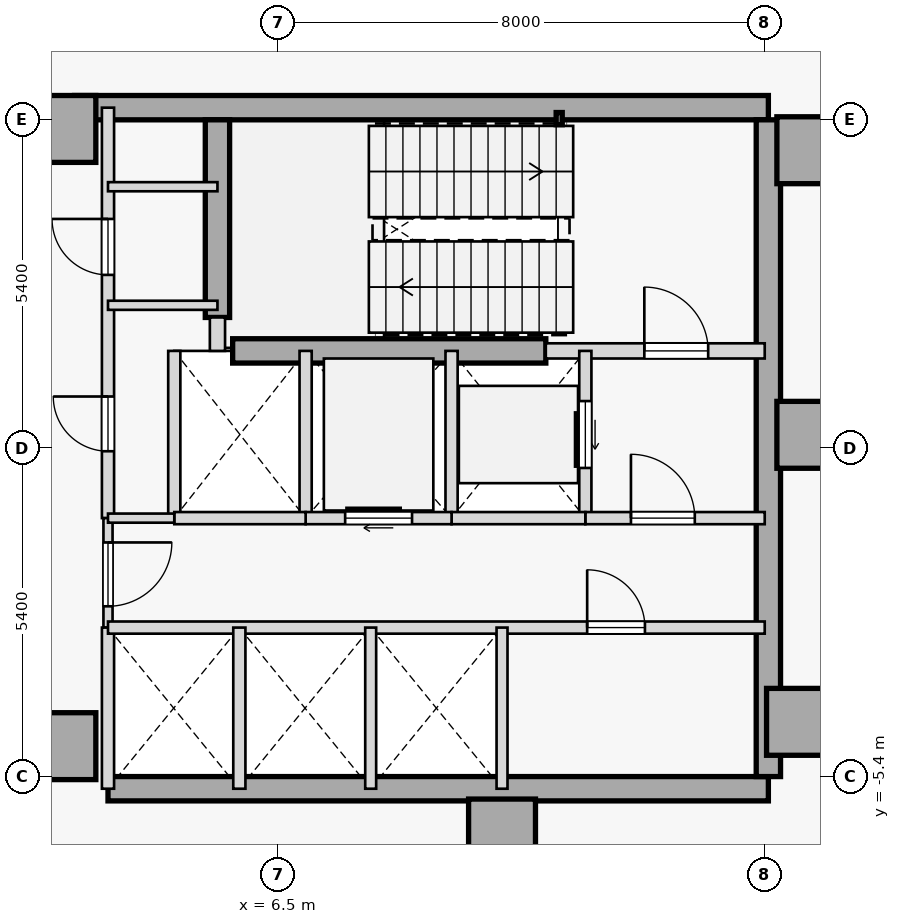
"""IFC4 building model, lengths in metres.
Left out: names, types, materials, properties, quantities, classifications, styles, units other than length and angle.
Written with IfcOpenShell. Run it as: python <this file> out.ifc"""

import sys

from ifc_helpers import new_model, si_unit, direction, frame, frame_2d, origin, origin_2d, place, context, subcontext, project, spatial, rectangle, hollow_rectangle, extrude, element, fill, save


model = new_model("IFC4")
c1 = context("Model", 3, precision=1e-05, world=origin(), true_north=direction((0.0, 1.0)))
c2 = subcontext(c1, "Body", "Model", "MODEL_VIEW")
j1 = project(units=[si_unit("LENGTHUNIT", "METRE"), si_unit("PLANEANGLEUNIT", "RADIAN")], contexts=[c1])
p1 = place(None, origin())
s1 = spatial("IfcSite", under=j1, at=p1, CompositionType="ELEMENT")
p2 = place(p1, origin())
s2 = spatial("IfcBuilding", under=s1, at=p2, CompositionType="ELEMENT")
p3 = place(p2, frame((0.0, 0.0, 142.9)))
s3 = spatial("IfcBuildingStorey", under=s2, at=p3, CompositionType="ELEMENT", Elevation=142.9)
for number, where, z_axis, x_axis in (
    (1, (15.25, 4.9, 0.0), (0.0, 0.0, 1.0), (1.0, 0.0, 0.0)),
    (2, (15.25, 0.22, 0.0), (0.0, 0.0, 1.0), (1.0, 0.0, 0.0)),
    (3, (15.08, -4.5, 0.0), (0.0, 0.0, 1.0), (1.0, 0.0, 0.0)),
    (4, (10.18, -6.32, 0.0), (0.0, 0.0, 1.0), (1.0, 0.0, 0.0)),
    (5, (2.95, -4.9, 0.0), (0.0, 0.0, 1.0), (1.0, 0.0, 0.0)),
    (6, (2.95, 5.25, 0.0), (0.0, 0.0, 1.0), (1.0, 0.0, 0.0)),
):
    element("IfcColumn", number, at=place(p3, frame(where, z_axis=z_axis, x_axis=x_axis)), inside=s3, PredefinedType="COLUMN", context=c2, shape_type="SweptSolid", body=[
        extrude(rectangle(XDim=1.1, YDim=1.1, at=origin_2d()), origin(), (0.0, 0.0, 1.0), 4.4),
    ])
p4 = place(p3, frame((3.15, 5.6, 0.0), z_axis=(0.0, 0.0, 1.0), x_axis=(1.0, 0.0, 0.0)))
e7 = element("IfcWall", 7, at=p4, inside=s3, PredefinedType="SHEAR", context=c2, shape_type="SweptSolid", body=[
    extrude(rectangle(XDim=11.41, YDim=0.4, at=frame_2d((5.705, 0.0))), origin(), (0.0, 0.0, 1.0), 4.15),
])
p5 = place(p3, frame((3.7, -5.6, 0.0), z_axis=(0.0, 0.0, 1.0), x_axis=(1.0, 0.0, 0.0)))
e8 = element("IfcWall", 8, at=p5, inside=s3, PredefinedType="SHEAR", context=c2, shape_type="SweptSolid", body=[
    extrude(rectangle(XDim=10.86, YDim=0.4, at=frame_2d((5.43, 0.0))), origin(), (0.0, 0.0, 1.0), 4.15),
])
p6 = place(p3, frame((14.56, -5.4, 0.0), z_axis=(0.0, 0.0, 1.0), x_axis=(0.0, 1.0, 0.0)))
e9 = element("IfcWall", 9, at=p6, inside=s3, PredefinedType="SHEAR", context=c2, shape_type="SweptSolid", body=[
    extrude(rectangle(XDim=10.8, YDim=0.4, at=frame_2d((5.4, 0.0))), origin(), (0.0, 0.0, 1.0), 4.15),
])
p7 = place(p3, frame((5.5, 2.15, 0.0), z_axis=(0.0, 0.0, 1.0), x_axis=(0.0, 1.0, 0.0)))
e10 = element("IfcWall", 10, at=p7, inside=s3, PredefinedType="SHEAR", context=c2, shape_type="SweptSolid", body=[
    extrude(rectangle(XDim=3.25, YDim=0.4, at=frame_2d((1.625, 0.0))), origin(), (0.0, 0.0, 1.0), 4.15),
])
p8 = place(p3, frame((5.75, 1.6, 0.0), z_axis=(0.0, 0.0, 1.0), x_axis=(1.0, 0.0, 0.0)))
e11 = element("IfcWall", 11, at=p8, inside=s3, PredefinedType="SHEAR", context=c2, shape_type="SweptSolid", body=[
    extrude(rectangle(XDim=5.15, YDim=0.4, at=frame_2d((2.575, 0.0))), origin(), (0.0, 0.0, 1.0), 4.15),
])
p9 = place(p3, frame((11.12, 5.42, 0.0), z_axis=(0.0, 0.0, 1.0), x_axis=(1.0, 0.0, 0.0)))
e12 = element("IfcColumn", 12, at=p9, inside=s3, PredefinedType="COLUMN", context=c2, shape_type="SweptSolid", body=[
    extrude(hollow_rectangle(XDim=0.1, YDim=0.2, WallThickness=0.008, at=origin_2d()), origin(), (0.0, 0.0, 1.0), 4.4),
])
p10 = place(p3, frame((10.9, 1.6, 0.0), z_axis=(0.0, 0.0, 1.0), x_axis=(1.0, 0.0, 0.0)))
e13 = element("IfcWall", 13, at=p10, inside=s3, PredefinedType="STANDARD", context=c2, shape_type="SweptSolid", body=[
    extrude(rectangle(XDim=3.6, YDim=0.25, at=frame_2d((1.8, 0.0))), origin(), (0.0, 0.0, 1.0), 4.15),
])
p11 = place(p10, frame((1.62, 0.0, 0.0)))
e14 = element("IfcOpeningElement", 14, at=p11, cuts=e13, PredefinedType="OPENING", context=c2, shape_type="SweptSolid", body=[
    extrude(rectangle(XDim=1.05, YDim=2.15, at=frame_2d((0.525, 1.075))), frame((0.0, 0.135, 0.0), z_axis=(0.0, -1.0, 0.0), x_axis=(1.0, 0.0, 0.0)), (0.0, 0.0, 1.0), 0.27),
])
p12 = place(p3, frame((5.5, 1.6, 0.0), z_axis=(0.0, 0.0, 1.0), x_axis=(0.0, 1.0, 0.0)))
e15 = element("IfcWall", 15, at=p12, inside=s3, PredefinedType="STANDARD", context=c2, shape_type="SweptSolid", body=[
    extrude(rectangle(XDim=0.55, YDim=0.25, at=frame_2d((0.275, 0.0))), origin(), (0.0, 0.0, 1.0), 4.15),
])
p13 = place(p3, frame((3.7, -1.15, 0.0), z_axis=(0.0, 0.0, 1.0), x_axis=(0.0, 1.0, 0.0)))
e16 = element("IfcWall", 16, at=p13, inside=s3, PredefinedType="STANDARD", context=c2, shape_type="SweptSolid", body=[
    extrude(rectangle(XDim=6.75, YDim=0.2, at=frame_2d((3.375, 0.0))), origin(), (0.0, 0.0, 1.0), 4.15),
])
p14 = place(p13, frame((1.1, 0.0, 0.0)))
e17 = element("IfcOpeningElement", 17, at=p14, cuts=e16, PredefinedType="OPENING", context=c2, shape_type="SweptSolid", body=[
    extrude(rectangle(XDim=0.9, YDim=2.15, at=frame_2d((0.45, 1.075))), frame((0.0, 0.11, 0.0), z_axis=(0.0, -1.0, 0.0), x_axis=(1.0, 0.0, 0.0)), (0.0, 0.0, 1.0), 0.22),
])
p15 = place(p13, frame((4.0, 0.0, 0.0)))
e18 = element("IfcOpeningElement", 18, at=p15, cuts=e16, PredefinedType="OPENING", context=c2, shape_type="SweptSolid", body=[
    extrude(rectangle(XDim=0.92, YDim=2.15, at=frame_2d((0.46, 1.075))), frame((0.0, 0.11, 0.0), z_axis=(0.0, -1.0, 0.0), x_axis=(1.0, 0.0, 0.0)), (0.0, 0.0, 1.0), 0.22),
])
p16 = place(p3, frame((3.7, -2.95, 0.0), z_axis=(0.0, 0.0, 1.0), x_axis=(0.0, 1.0, 0.0)))
e19 = element("IfcWall", 19, at=p16, inside=s3, PredefinedType="PARTITIONING", context=c2, shape_type="SweptSolid", body=[
    extrude(rectangle(XDim=1.8, YDim=0.15, at=frame_2d((0.9, 0.0))), origin(), (0.0, 0.0, 1.0), 4.15),
])
p17 = place(p16, frame((0.35, 0.0, 0.0)))
e20 = element("IfcOpeningElement", 20, at=p17, cuts=e19, PredefinedType="OPENING", context=c2, shape_type="SweptSolid", body=[
    extrude(rectangle(XDim=1.05, YDim=2.18, at=frame_2d((0.525, 1.09))), frame((0.0, 0.085, 0.0), z_axis=(0.0, -1.0, 0.0), x_axis=(1.0, 0.0, 0.0)), (0.0, 0.0, 1.0), 0.17),
])
p18 = place(p3, frame((3.7, -5.6, 0.0), z_axis=(0.0, 0.0, 1.0), x_axis=(0.0, 1.0, 0.0)))
e21 = element("IfcWall", 21, at=p18, inside=s3, PredefinedType="STANDARD", context=c2, shape_type="SweptSolid", body=[
    extrude(rectangle(XDim=2.65, YDim=0.2, at=frame_2d((1.325, 0.0))), origin(), (0.0, 0.0, 1.0), 4.15),
])
p19 = place(p3, frame((11.55, -1.15, 0.0), z_axis=(0.0, 0.0, 1.0), x_axis=(0.0, 1.0, 0.0)))
e22 = element("IfcWall", 22, at=p19, inside=s3, PredefinedType="STANDARD", context=c2, shape_type="SweptSolid", body=[
    extrude(rectangle(XDim=2.75, YDim=0.2, at=frame_2d((1.375, 0.0))), origin(), (0.0, 0.0, 1.0), 4.15),
])
p20 = place(p19, frame((0.825, 0.0, 0.0)))
e23 = element("IfcOpeningElement", 23, at=p20, cuts=e22, PredefinedType="OPENING", context=c2, shape_type="SweptSolid", body=[
    extrude(rectangle(XDim=1.1, YDim=2.15, at=frame_2d((0.55, 1.075))), frame((0.0, 0.11, 0.0), z_axis=(0.0, -1.0, 0.0), x_axis=(1.0, 0.0, 0.0)), (0.0, 0.0, 1.0), 0.22),
])
p21 = place(p3, frame((9.35, -1.15, 0.0), z_axis=(0.0, 0.0, 1.0), x_axis=(0.0, 1.0, 0.0)))
e24 = element("IfcWall", 24, at=p21, inside=s3, PredefinedType="STANDARD", context=c2, shape_type="SweptSolid", body=[
    extrude(rectangle(XDim=2.75, YDim=0.2, at=frame_2d((1.375, 0.0))), origin(), (0.0, 0.0, 1.0), 4.15),
])
p22 = place(p3, frame((11.55, -1.15, 0.0), z_axis=(0.0, 0.0, 1.0), x_axis=(1.0, 0.0, 0.0)))
e25 = element("IfcWall", 25, at=p22, inside=s3, PredefinedType="STANDARD", context=c2, shape_type="SweptSolid", body=[
    extrude(rectangle(XDim=2.95, YDim=0.2, at=frame_2d((1.475, 0.0))), origin(), (0.0, 0.0, 1.0), 4.15),
])
p23 = place(p22, frame((0.75, 0.0, 0.0)))
e26 = element("IfcOpeningElement", 26, at=p23, cuts=e25, PredefinedType="OPENING", context=c2, shape_type="SweptSolid", body=[
    extrude(rectangle(XDim=1.05, YDim=2.18, at=frame_2d((0.525, 1.09))), frame((0.0, 0.11, 0.0), z_axis=(0.0, -1.0, 0.0), x_axis=(1.0, 0.0, 0.0)), (0.0, 0.0, 1.0), 0.22),
])
p24 = place(p3, frame((9.35, -1.15, 0.0), z_axis=(0.0, 0.0, 1.0), x_axis=(1.0, 0.0, 0.0)))
e27 = element("IfcWall", 27, at=p24, inside=s3, PredefinedType="STANDARD", context=c2, shape_type="SweptSolid", body=[
    extrude(rectangle(XDim=2.2, YDim=0.2, at=frame_2d((1.1, 0.0))), origin(), (0.0, 0.0, 1.0), 4.15),
])
p25 = place(p3, frame((6.95, -1.15, 0.0), z_axis=(0.0, 0.0, 1.0), x_axis=(0.0, 1.0, 0.0)))
e28 = element("IfcWall", 28, at=p25, inside=s3, PredefinedType="STANDARD", context=c2, shape_type="SweptSolid", body=[
    extrude(rectangle(XDim=2.75, YDim=0.2, at=frame_2d((1.375, 0.0))), origin(), (0.0, 0.0, 1.0), 4.15),
])
p26 = place(p3, frame((6.95, -1.15, 0.0), z_axis=(0.0, 0.0, 1.0), x_axis=(1.0, 0.0, 0.0)))
e29 = element("IfcWall", 29, at=p26, inside=s3, PredefinedType="STANDARD", context=c2, shape_type="SweptSolid", body=[
    extrude(rectangle(XDim=2.4, YDim=0.2, at=frame_2d((1.2, 0.0))), origin(), (0.0, 0.0, 1.0), 4.15),
])
p27 = place(p26, frame((0.65, 0.0, 0.0)))
e30 = element("IfcOpeningElement", 30, at=p27, cuts=e29, PredefinedType="OPENING", context=c2, shape_type="SweptSolid", body=[
    extrude(rectangle(XDim=1.1, YDim=2.15, at=frame_2d((0.55, 1.075))), frame((0.0, 0.11, 0.0), z_axis=(0.0, -1.0, 0.0), x_axis=(1.0, 0.0, 0.0)), (0.0, 0.0, 1.0), 0.22),
])
p28 = place(p3, frame((4.79, -1.15, 0.0), z_axis=(0.0, 0.0, 1.0), x_axis=(0.0, 1.0, 0.0)))
e31 = element("IfcWall", 31, at=p28, inside=s3, PredefinedType="STANDARD", context=c2, shape_type="SweptSolid", body=[
    extrude(rectangle(XDim=2.75, YDim=0.2, at=frame_2d((1.375, 0.0))), origin(), (0.0, 0.0, 1.0), 4.15),
])
p29 = place(p3, frame((4.79, -1.15, 0.0), z_axis=(0.0, 0.0, 1.0), x_axis=(1.0, 0.0, 0.0)))
e32 = element("IfcWall", 32, at=p29, inside=s3, PredefinedType="STANDARD", context=c2, shape_type="SweptSolid", body=[
    extrude(rectangle(XDim=2.16, YDim=0.2, at=frame_2d((1.08, 0.0))), origin(), (0.0, 0.0, 1.0), 4.15),
])
p30 = place(p3, frame((3.7, -1.15, 0.0), z_axis=(0.0, 0.0, 1.0), x_axis=(1.0, 0.0, 0.0)))
e33 = element("IfcWall", 33, at=p30, inside=s3, PredefinedType="PARTITIONING", context=c2, shape_type="SweptSolid", body=[
    extrude(rectangle(XDim=1.09, YDim=0.15, at=frame_2d((0.545, 0.0))), origin(), (0.0, 0.0, 1.0), 4.15),
])
p31 = place(p3, frame((3.7, -2.95, 0.0), z_axis=(0.0, 0.0, 1.0), x_axis=(1.0, 0.0, 0.0)))
e34 = element("IfcWall", 34, at=p31, inside=s3, PredefinedType="STANDARD", context=c2, shape_type="SweptSolid", body=[
    extrude(rectangle(XDim=10.8, YDim=0.2, at=frame_2d((5.4, 0.0))), origin(), (0.0, 0.0, 1.0), 4.15),
])
p32 = place(p31, frame((7.88, 0.0, 0.0)))
e35 = element("IfcOpeningElement", 35, at=p32, cuts=e34, PredefinedType="OPENING", context=c2, shape_type="SweptSolid", body=[
    extrude(rectangle(XDim=0.95, YDim=2.15, at=frame_2d((0.475, 1.075))), frame((0.0, 0.11, 0.0), z_axis=(0.0, -1.0, 0.0), x_axis=(1.0, 0.0, 0.0)), (0.0, 0.0, 1.0), 0.22),
])
p33 = place(p3, frame((5.86, -5.6, 0.0), z_axis=(0.0, 0.0, 1.0), x_axis=(0.0, 1.0, 0.0)))
e36 = element("IfcWall", 36, at=p33, inside=s3, PredefinedType="STANDARD", context=c2, shape_type="SweptSolid", body=[
    extrude(rectangle(XDim=2.65, YDim=0.2, at=frame_2d((1.325, 0.0))), origin(), (0.0, 0.0, 1.0), 4.15),
])
for number, where, z_axis, x_axis in (
    (37, (10.18, -5.6, 0.0), (0.0, 0.0, 1.0), (0.0, 1.0, 0.0)),
    (38, (8.02, -5.6, 0.0), (0.0, 0.0, 1.0), (0.0, 1.0, 0.0)),
):
    element("IfcWall", number, at=place(p3, frame(where, z_axis=z_axis, x_axis=x_axis)), inside=s3, PredefinedType="STANDARD", context=c2, shape_type="SweptSolid", body=[
        extrude(rectangle(XDim=2.65, YDim=0.18, at=frame_2d((1.325, 0.0))), origin(), (0.0, 0.0, 1.0), 4.15),
    ])
for number, where, z_axis, x_axis in (
    (39, (3.7, 4.3, 0.0), (0.0, 0.0, 1.0), (1.0, 0.0, 0.0)),
    (40, (3.7, 2.35, 0.0), (0.0, 0.0, 1.0), (1.0, 0.0, 0.0)),
):
    element("IfcWall", number, at=place(p3, frame(where, z_axis=z_axis, x_axis=x_axis)), inside=s3, PredefinedType="PARTITIONING", context=c2, shape_type="SweptSolid", body=[
        extrude(rectangle(XDim=1.8, YDim=0.15, at=frame_2d((0.9, 0.0))), origin(), (0.0, 0.0, 1.0), 4.15),
    ])
p34 = place(p11, origin())
e41 = element("IfcDoor", 41, at=p34, inside=s3, OperationType="SINGLE_SWING_LEFT", PredefinedType="DOOR", context=c2, shape_type="SweptSolid", body=[
    extrude(rectangle(XDim=1.05, YDim=2.15, at=frame_2d((0.525, 1.075))), frame((0.0, 0.025, 0.0), z_axis=(0.0, -1.0, 0.0), x_axis=(1.0, 0.0, 0.0)), (0.0, 0.0, 1.0), 0.05),
])
fill(e14, e41)
p35 = place(p23, origin())
e42 = element("IfcDoor", 42, at=p35, inside=s3, OperationType="SINGLE_SWING_LEFT", PredefinedType="DOOR", context=c2, shape_type="SweptSolid", body=[
    extrude(rectangle(XDim=1.05, YDim=2.18, at=frame_2d((0.525, 1.09))), frame((0.0, 0.025, 0.0), z_axis=(0.0, -1.0, 0.0), x_axis=(1.0, 0.0, 0.0)), (0.0, 0.0, 1.0), 0.05),
])
fill(e26, e42)
p36 = place(p17, frame((1.05, 0.0, 0.0), z_axis=(0.0, 0.0, 1.0), x_axis=(-1.0, 0.0, 0.0)))
e43 = element("IfcDoor", 43, at=p36, inside=s3, OperationType="SINGLE_SWING_RIGHT", PredefinedType="DOOR", context=c2, shape_type="SweptSolid", body=[
    extrude(rectangle(XDim=1.05, YDim=2.18, at=frame_2d((0.525, 1.09))), frame((0.0, 0.025, 0.0), z_axis=(0.0, -1.0, 0.0), x_axis=(1.0, 0.0, 0.0)), (0.0, 0.0, 1.0), 0.05),
])
fill(e20, e43)
p37 = place(p20, origin())
e44 = element("IfcDoor", 44, at=p37, inside=s3, OperationType="SLIDING_TO_RIGHT", PredefinedType="DOOR", context=c2, shape_type="SweptSolid", body=[
    extrude(rectangle(XDim=1.1, YDim=2.15, at=frame_2d((0.55, 1.075))), frame((0.0, 0.025, 0.0), z_axis=(0.0, -1.0, 0.0), x_axis=(1.0, 0.0, 0.0)), (0.0, 0.0, 1.0), 0.05),
])
fill(e23, e44)
p38 = place(p27, origin())
e45 = element("IfcDoor", 45, at=p38, inside=s3, OperationType="SLIDING_TO_RIGHT", PredefinedType="DOOR", context=c2, shape_type="SweptSolid", body=[
    extrude(rectangle(XDim=1.1, YDim=2.15, at=frame_2d((0.55, 1.075))), frame((0.0, 0.025, 0.0), z_axis=(0.0, -1.0, 0.0), x_axis=(1.0, 0.0, 0.0)), (0.0, 0.0, 1.0), 0.05),
])
fill(e30, e45)
p39 = place(p32, origin())
e46 = element("IfcDoor", 46, at=p39, inside=s3, OperationType="SINGLE_SWING_LEFT", PredefinedType="DOOR", context=c2, shape_type="SweptSolid", body=[
    extrude(rectangle(XDim=0.95, YDim=2.15, at=frame_2d((0.475, 1.075))), frame((0.0, 0.025, 0.0), z_axis=(0.0, -1.0, 0.0), x_axis=(1.0, 0.0, 0.0)), (0.0, 0.0, 1.0), 0.05),
])
fill(e35, e46)
p40 = place(p14, origin())
e47 = element("IfcDoor", 47, at=p40, inside=s3, OperationType="SINGLE_SWING_RIGHT", PredefinedType="DOOR", context=c2, shape_type="SweptSolid", body=[
    extrude(rectangle(XDim=0.9, YDim=2.15, at=frame_2d((0.45, 1.075))), frame((0.0, 0.025, 0.0), z_axis=(0.0, -1.0, 0.0), x_axis=(1.0, 0.0, 0.0)), (0.0, 0.0, 1.0), 0.05),
])
fill(e17, e47)
p41 = place(p15, origin())
e48 = element("IfcDoor", 48, at=p41, inside=s3, OperationType="SINGLE_SWING_RIGHT", PredefinedType="DOOR", context=c2, shape_type="SweptSolid", body=[
    extrude(rectangle(XDim=0.92, YDim=2.15, at=frame_2d((0.46, 1.075))), frame((0.0, 0.025, 0.0), z_axis=(0.0, -1.0, 0.0), x_axis=(1.0, 0.0, 0.0)), (0.0, 0.0, 1.0), 0.05),
])
fill(e18, e48)
save(model, sys.argv[1])
